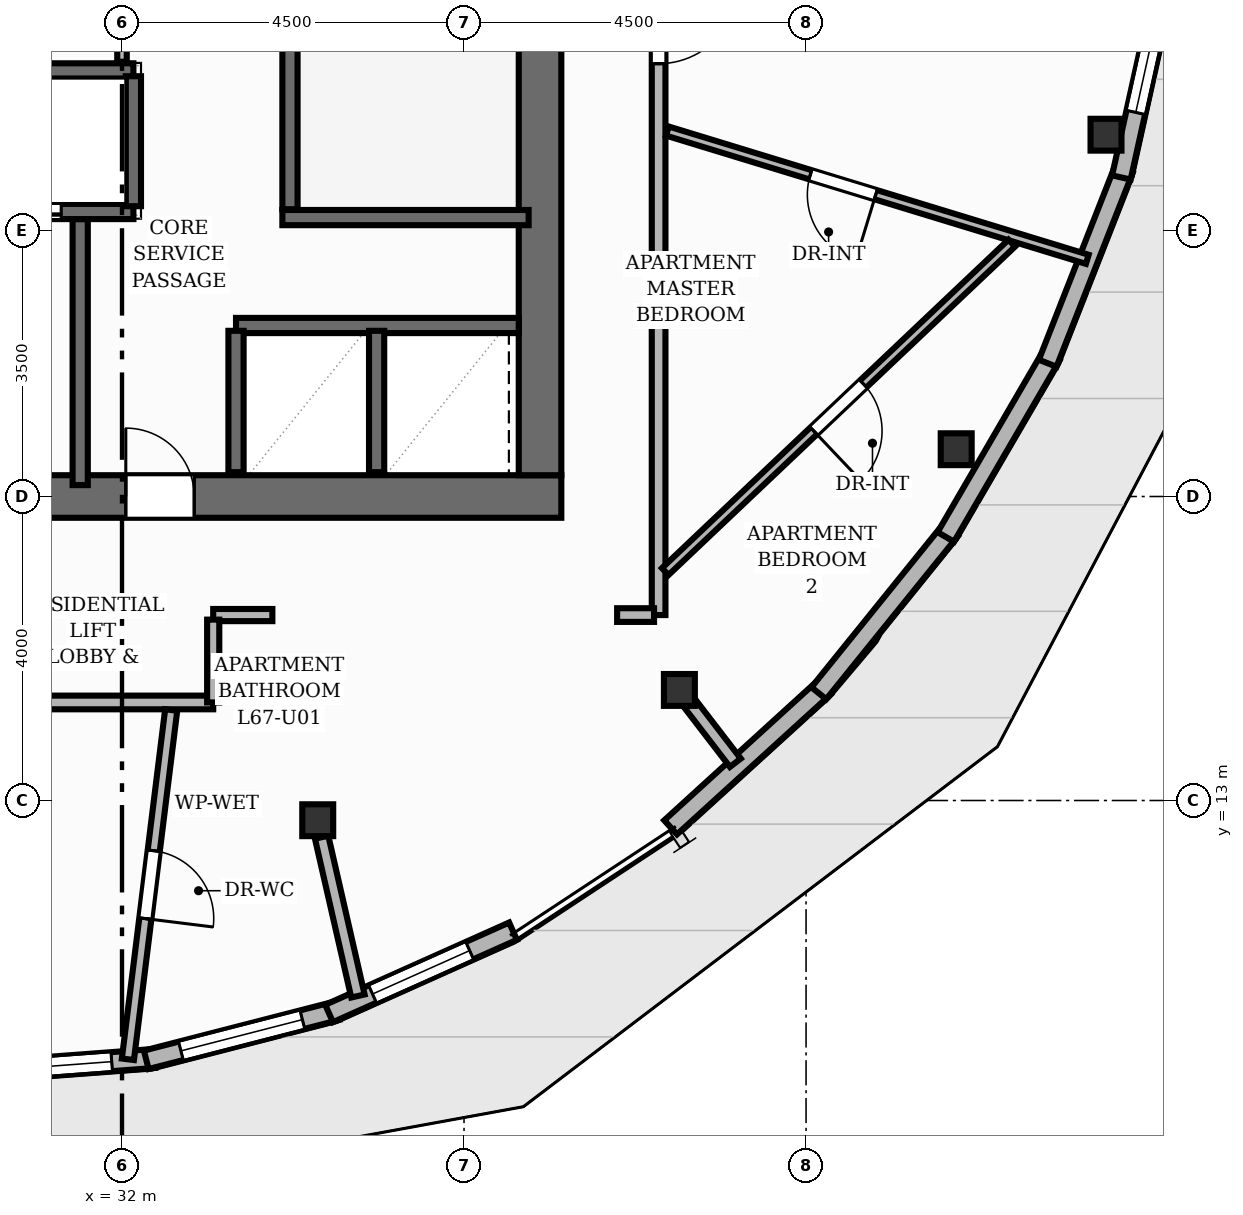
"""IFC4 building model, lengths in metres.
Left out: names, types, materials, properties, quantities, classifications, styles, units other than length and angle.
Written with IfcOpenShell. Run it as: python <this file> out.ifc"""

import sys

from ifc_helpers import new_model, si_unit, direction, frame, frame_2d, origin, origin_2d, place, context, subcontext, project, spatial, rectangle, i_section, extrude, element, fill, save


model = new_model("IFC4")
c1 = context("Model", 3, precision=1e-05, world=origin(), true_north=direction((0.0, 1.0)))
c2 = subcontext(c1, "Body", "Model", "MODEL_VIEW")
j1 = project(units=[si_unit("LENGTHUNIT", "METRE"), si_unit("PLANEANGLEUNIT", "RADIAN")], contexts=[c1])
p1 = place(None, origin())
s1 = spatial("IfcSite", under=j1, at=p1, CompositionType="ELEMENT")
p2 = place(p1, origin())
s2 = spatial("IfcBuilding", under=s1, at=p2, CompositionType="ELEMENT")
p3 = place(p2, frame((0.0, 0.0, 223.84)))
s3 = spatial("IfcBuildingStorey", under=s2, at=p3, CompositionType="ELEMENT", Elevation=223.84)
p4 = place(p3, frame((26.22, 17.0, 0.0), z_axis=(0.0, 0.0, 1.0), x_axis=(1.0, 0.0, 0.0)))
e1 = element("IfcWall", 1, at=p4, inside=s3, PredefinedType="SHEAR", context=c2, shape_type="SweptSolid", body=[
    extrude(rectangle(XDim=11.56, YDim=0.56, at=frame_2d((5.78, 0.0))), origin(), (0.0, 0.0, 1.0), 3.2),
])
p5 = place(p4, frame((2.28, 0.0, 0.0)))
e2 = element("IfcOpeningElement", 2, at=p5, cuts=e1, PredefinedType="OPENING", context=c2, shape_type="SweptSolid", body=[
    extrude(rectangle(XDim=1.1, YDim=2.15, at=frame_2d((0.55, 1.075))), frame((0.0, 0.29, 0.0), z_axis=(0.0, -1.0, 0.0), x_axis=(1.0, 0.0, 0.0)), (0.0, 0.0, 1.0), 0.58),
])
p6 = place(p4, frame((5.83, 0.0, 0.0)))
e3 = element("IfcOpeningElement", 3, at=p6, cuts=e1, PredefinedType="OPENING", context=c2, shape_type="SweptSolid", body=[
    extrude(rectangle(XDim=0.9, YDim=2.1, at=frame_2d((0.45, 1.05))), frame((0.0, 0.29, 0.0), z_axis=(0.0, -1.0, 0.0), x_axis=(1.0, 0.0, 0.0)), (0.0, 0.0, 1.0), 0.58),
])
p7 = place(p3, frame((37.5, 17.28, 0.0), z_axis=(0.0, 0.0, 1.0), x_axis=(0.0, 1.0, 0.0)))
e4 = element("IfcWall", 4, at=p7, inside=s3, PredefinedType="SHEAR", context=c2, shape_type="SweptSolid", body=[
    extrude(rectangle(XDim=13.44, YDim=0.56, at=frame_2d((6.72, 0.0))), origin(), (0.0, 0.0, 1.0), 3.2),
])
for number, where, z_axis, x_axis in (
    (5, (34.575, 12.74, 0.0), (0.0, 0.0, 1.0), (1.0, 0.0, 0.0)),
    (6, (39.333, 14.455, 0.0), (0.0, 0.0, 1.0), (1.0, 0.0, 0.0)),
    (7, (42.975, 17.622, 0.0), (0.0, 0.0, 1.0), (1.0, 0.0, 0.0)),
    (8, (44.946, 21.76, 0.0), (0.0, 0.0, 1.0), (1.0, 0.0, 0.0)),
):
    element("IfcColumn", number, at=place(p3, frame(where, z_axis=z_axis, x_axis=x_axis)), inside=s3, PredefinedType="COLUMN", context=c2, shape_type="SweptSolid", body=[
        extrude(i_section(OverallWidth=0.407, OverallDepth=0.419, WebThickness=0.031, FlangeThickness=0.049, at=origin_2d()), origin(), (0.0, 0.0, 1.0), 3.2),
    ])
p8 = place(p3, frame((32.429, 9.606, 0.0), z_axis=(0.0, 0.0, 1.0), x_axis=(-0.997203982256, -0.074727623888, 0.0)))
e9 = element("IfcWall", 9, at=p8, inside=s3, PredefinedType="SOLIDWALL", context=c2, shape_type="SweptSolid", body=[
    extrude(rectangle(XDim=2.532, YDim=0.25, at=frame_2d((1.266, 0.0))), origin(), (0.0, 0.0, 1.0), 2.96),
])
p9 = place(p8, frame((0.566, 0.0, 0.85)))
e10 = element("IfcOpeningElement", 10, at=p9, cuts=e9, PredefinedType="OPENING", context=c2, shape_type="SweptSolid", body=[
    extrude(rectangle(XDim=1.4, YDim=1.55, at=frame_2d((0.7, 0.775))), frame((0.0, 0.135, 0.0), z_axis=(0.0, -1.0, 0.0), x_axis=(1.0, 0.0, 0.0)), (0.0, 0.0, 1.0), 0.27),
])
p10 = place(p3, frame((34.829, 10.234, 0.0), z_axis=(0.0, 0.0, 1.0), x_axis=(-0.968423445169, -0.249311112562, 0.0)))
e11 = element("IfcWall", 11, at=p10, inside=s3, PredefinedType="SOLIDWALL", context=c2, shape_type="SweptSolid", body=[
    extrude(rectangle(XDim=2.592, YDim=0.25, at=frame_2d((1.296, 0.0))), origin(), (0.0, 0.0, 1.0), 2.96),
])
p11 = place(p10, frame((0.471, 0.0, 0.85)))
e12 = element("IfcOpeningElement", 12, at=p11, cuts=e11, PredefinedType="OPENING", context=c2, shape_type="SweptSolid", body=[
    extrude(rectangle(XDim=1.65, YDim=1.55, at=frame_2d((0.825, 0.775))), frame((0.0, 0.135, 0.0), z_axis=(0.0, -1.0, 0.0), x_axis=(1.0, 0.0, 0.0)), (0.0, 0.0, 1.0), 0.27),
])
p12 = place(p3, frame((37.145, 11.281, 0.0), z_axis=(0.0, 0.0, 1.0), x_axis=(-0.912779399898, -0.408452894617, 0.0)))
e13 = element("IfcWall", 13, at=p12, inside=s3, PredefinedType="SOLIDWALL", context=c2, shape_type="SweptSolid", body=[
    extrude(rectangle(XDim=2.651, YDim=0.25, at=frame_2d((1.325, 0.0))), origin(), (0.0, 0.0, 1.0), 2.96),
])
p13 = place(p12, frame((0.625, 0.0, 0.85)))
e14 = element("IfcOpeningElement", 14, at=p13, cuts=e13, PredefinedType="OPENING", context=c2, shape_type="SweptSolid", body=[
    extrude(rectangle(XDim=1.4, YDim=1.52, at=frame_2d((0.7, 0.76))), frame((0.0, 0.135, 0.0), z_axis=(0.0, -1.0, 0.0), x_axis=(1.0, 0.0, 0.0)), (0.0, 0.0, 1.0), 0.27),
])
p14 = place(p3, frame((41.243, 14.49, 0.0), z_axis=(0.0, 0.0, 1.0), x_axis=(-0.739366950434, -0.673302690182, 0.0)))
e15 = element("IfcWall", 15, at=p14, inside=s3, PredefinedType="SOLIDWALL", context=c2, shape_type="SweptSolid", body=[
    extrude(rectangle(XDim=2.738, YDim=0.25, at=frame_2d((1.369, 0.0))), origin(), (0.0, 0.0, 1.0), 2.96),
])
p15 = place(p3, frame((42.9, 16.558, 0.0), z_axis=(0.0, 0.0, 1.0), x_axis=(-0.628046541479, -0.778175778174, 0.0)))
e16 = element("IfcWall", 16, at=p15, inside=s3, PredefinedType="SOLIDWALL", context=c2, shape_type="SweptSolid", body=[
    extrude(rectangle(XDim=2.758, YDim=0.25, at=frame_2d((1.379, 0.0))), origin(), (0.0, 0.0, 1.0), 2.96),
])
p16 = place(p3, frame((44.227, 18.851, 0.0), z_axis=(0.0, 0.0, 1.0), x_axis=(-0.503177339128, -0.864183178144, 0.0)))
e17 = element("IfcWall", 17, at=p16, inside=s3, PredefinedType="SOLIDWALL", context=c2, shape_type="SweptSolid", body=[
    extrude(rectangle(XDim=2.758, YDim=0.25, at=frame_2d((1.379, 0.0))), origin(), (0.0, 0.0, 1.0), 2.96),
])
p17 = place(p3, frame((45.18, 21.302, 0.0), z_axis=(0.0, 0.0, 1.0), x_axis=(-0.365588934877, -0.930776412838, 0.0)))
e18 = element("IfcWall", 18, at=p17, inside=s3, PredefinedType="SOLIDWALL", context=c2, shape_type="SweptSolid", body=[
    extrude(rectangle(XDim=2.739, YDim=0.25, at=frame_2d((1.369, 0.0))), origin(), (0.0, 0.0, 1.0), 2.577),
])
p18 = place(p3, frame((45.733, 23.836, 0.0), z_axis=(0.0, 0.0, 1.0), x_axis=(-0.21633718885, -0.976318708579, 0.0)))
e19 = element("IfcWall", 19, at=p18, inside=s3, PredefinedType="SOLIDWALL", context=c2, shape_type="SweptSolid", body=[
    extrude(rectangle(XDim=2.702, YDim=0.25, at=frame_2d((1.351, 0.0))), origin(), (0.0, 0.0, 1.0), 2.577),
])
p19 = place(p18, frame((0.175, 0.0, 0.85)))
e20 = element("IfcOpeningElement", 20, at=p19, cuts=e19, PredefinedType="OPENING", context=c2, shape_type="SweptSolid", body=[
    extrude(rectangle(XDim=1.65, YDim=1.55, at=frame_2d((0.825, 0.775))), frame((0.0, 0.135, 0.0), z_axis=(0.0, -1.0, 0.0), x_axis=(1.0, 0.0, 0.0)), (0.0, 0.0, 1.0), 0.27),
])
p20 = place(p3, frame((34.21, 20.78, 0.0), z_axis=(0.0, 0.0, 1.0), x_axis=(0.0, 1.0, 0.0)))
e21 = element("IfcWall", 21, at=p20, inside=s3, PredefinedType="SHEAR", context=c2, shape_type="SweptSolid", body=[
    extrude(rectangle(XDim=6.44, YDim=0.2, at=frame_2d((3.22, 0.0))), origin(), (0.0, 0.0, 1.0), 3.2),
])
p21 = place(p3, frame((34.11, 20.67, 0.0), z_axis=(0.0, 0.0, 1.0), x_axis=(1.0, 0.0, 0.0)))
e22 = element("IfcWall", 22, at=p21, inside=s3, PredefinedType="SHEAR", context=c2, shape_type="SweptSolid", body=[
    extrude(rectangle(XDim=3.24, YDim=0.2, at=frame_2d((1.62, 0.0))), origin(), (0.0, 0.0, 1.0), 3.2),
])
p22 = place(p3, frame((31.45, 17.15, 0.0), z_axis=(0.0, 0.0, 1.0), x_axis=(0.0, 1.0, 0.0)))
e23 = element("IfcWall", 23, at=p22, inside=s3, PredefinedType="SHEAR", context=c2, shape_type="SweptSolid", body=[
    extrude(rectangle(XDim=3.5, YDim=0.2, at=frame_2d((1.75, 0.0))), origin(), (0.0, 0.0, 1.0), 3.2),
])
p23 = place(p3, frame((29.85, 20.75, 0.0), z_axis=(0.0, 0.0, 1.0), x_axis=(1.0, 0.0, 0.0)))
e24 = element("IfcWall", 24, at=p23, inside=s3, PredefinedType="SHEAR", context=c2, shape_type="SweptSolid", body=[
    extrude(rectangle(XDim=2.3, YDim=0.2, at=frame_2d((1.15, 0.0))), origin(), (0.0, 0.0, 1.0), 3.2),
])
p24 = place(p23, frame((0.25, 0.0, 0.0)))
e25 = element("IfcOpeningElement", 25, at=p24, cuts=e24, PredefinedType="OPENING", context=c2, shape_type="SweptSolid", body=[
    extrude(rectangle(XDim=1.1, YDim=2.15, at=frame_2d((0.55, 1.075))), frame((0.0, 0.11, 0.0), z_axis=(0.0, -1.0, 0.0), x_axis=(1.0, 0.0, 0.0)), (0.0, 0.0, 1.0), 0.22),
])
p25 = place(p3, frame((29.85, 22.6, 0.0), z_axis=(0.0, 0.0, 1.0), x_axis=(1.0, 0.0, 0.0)))
e26 = element("IfcWall", 26, at=p25, inside=s3, PredefinedType="SHEAR", context=c2, shape_type="SweptSolid", body=[
    extrude(rectangle(XDim=2.3, YDim=0.2, at=frame_2d((1.15, 0.0))), origin(), (0.0, 0.0, 1.0), 3.2),
])
p26 = place(p3, frame((32.15, 20.82, 0.0), z_axis=(0.0, 0.0, 1.0), x_axis=(0.0, 1.0, 0.0)))
e27 = element("IfcWall", 27, at=p26, inside=s3, PredefinedType="SHEAR", context=c2, shape_type="SweptSolid", body=[
    extrude(rectangle(XDim=1.71, YDim=0.2, at=frame_2d((0.855, 0.0))), origin(), (0.0, 0.0, 1.0), 3.2),
])
p27 = place(p3, frame((33.5, 19.25, 0.0), z_axis=(0.0, 0.0, 1.0), x_axis=(1.0, 0.0, 0.0)))
e28 = element("IfcWall", 28, at=p27, inside=s3, PredefinedType="SHEAR", context=c2, shape_type="SweptSolid", body=[
    extrude(rectangle(XDim=3.72, YDim=0.2, at=frame_2d((1.86, 0.0))), origin(), (0.0, 0.0, 1.0), 3.2),
])
for number, where, z_axis, x_axis in (
    (29, (33.5, 17.32, 0.0), (0.0, 0.0, 1.0), (0.0, 1.0, 0.0)),
    (30, (35.35, 17.32, 0.0), (0.0, 0.0, 1.0), (0.0, 1.0, 0.0)),
):
    element("IfcWall", number, at=place(p3, frame(where, z_axis=z_axis, x_axis=x_axis)), inside=s3, PredefinedType="SHEAR", context=c2, shape_type="SweptSolid", body=[
        extrude(rectangle(XDim=1.86, YDim=0.2, at=frame_2d((0.93, 0.0))), origin(), (0.0, 0.0, 1.0), 3.2),
    ])
p28 = place(p3, frame((32.0, 22.72, 0.0), z_axis=(0.0, 0.0, 1.0), x_axis=(0.0, 1.0, 0.0)))
e31 = element("IfcWall", 31, at=p28, inside=s3, PredefinedType="PARTITIONING", context=c2, shape_type="SweptSolid", body=[
    extrude(rectangle(XDim=2.52, YDim=0.125, at=frame_2d((1.26, 0.0))), origin(), (0.0, 0.0, 1.0), 2.955),
])
p29 = place(p28, frame((0.18, 0.0, 0.0)))
e32 = element("IfcOpeningElement", 32, at=p29, cuts=e31, PredefinedType="OPENING", context=c2, shape_type="SweptSolid", body=[
    extrude(rectangle(XDim=0.9, YDim=2.1, at=frame_2d((0.45, 1.05))), frame((0.0, 0.073, 0.0), z_axis=(0.0, -1.0, 0.0), x_axis=(1.0, 0.0, 0.0)), (0.0, 0.0, 1.0), 0.145),
])
p30 = place(p3, frame((34.626, 12.517, 0.0), z_axis=(0.0, 0.0, 1.0), x_axis=(0.222945438732, -0.974830924493, 0.0)))
e33 = element("IfcWall", 33, at=p30, inside=s3, PredefinedType="PARTITIONING", context=c2, shape_type="SweptSolid", body=[
    extrude(rectangle(XDim=2.143, YDim=0.18, at=frame_2d((1.072, 0.0))), origin(), (0.0, 0.0, 1.0), 2.403),
])
p31 = place(p3, frame((39.473, 14.273, 0.0), z_axis=(0.0, 0.0, 1.0), x_axis=(0.60918017505, -0.793031849503, 0.0)))
e34 = element("IfcWall", 34, at=p31, inside=s3, PredefinedType="PARTITIONING", context=c2, shape_type="SweptSolid", body=[
    extrude(rectangle(XDim=0.979, YDim=0.18, at=frame_2d((0.489, 0.0))), origin(), (0.0, 0.0, 1.0), 2.403),
])
p32 = place(p3, frame((33.2, 14.29, 0.0), z_axis=(0.0, 0.0, 1.0), x_axis=(-1.0, 0.0, 0.0)))
e35 = element("IfcWall", 35, at=p32, inside=s3, PredefinedType="PARTITIONING", context=c2, shape_type="SweptSolid", body=[
    extrude(rectangle(XDim=2.4, YDim=0.18, at=frame_2d((1.2, 0.0))), origin(), (0.0, 0.0, 1.0), 2.955),
])
p33 = place(p3, frame((33.978, 15.44, 0.0), z_axis=(0.0, 0.0, 1.0), x_axis=(-1.0, 0.0, 0.0)))
e36 = element("IfcWall", 36, at=p33, inside=s3, PredefinedType="PLUMBINGWALL", context=c2, shape_type="SweptSolid", body=[
    extrude(rectangle(XDim=0.778, YDim=0.16, at=frame_2d((0.389, 0.0))), origin(), (0.0, 0.0, 1.0), 2.955),
])
p34 = place(p3, frame((33.2, 15.38, 0.0), z_axis=(0.0, 0.0, 1.0), x_axis=(0.0, -1.0, 0.0)))
e37 = element("IfcWall", 37, at=p34, inside=s3, PredefinedType="PLUMBINGWALL", context=c2, shape_type="SweptSolid", body=[
    extrude(rectangle(XDim=1.09, YDim=0.16, at=frame_2d((0.545, 0.0))), origin(), (0.0, 0.0, 1.0), 2.955),
])
p35 = place(p3, frame((39.06, 32.56, 0.0), z_axis=(0.0, 0.0, 1.0), x_axis=(0.0, -1.0, 0.0)))
e38 = element("IfcWall", 38, at=p35, inside=s3, PredefinedType="PARTITIONING", context=c2, shape_type="SweptSolid", body=[
    extrude(rectangle(XDim=17.12, YDim=0.18, at=frame_2d((8.56, 0.0))), origin(), (0.0, 0.0, 1.0), 2.955),
])
p36 = place(p35, frame((8.815, 0.0, 0.0)))
e39 = element("IfcOpeningElement", 39, at=p36, cuts=e38, PredefinedType="OPENING", context=c2, shape_type="SweptSolid", body=[
    extrude(rectangle(XDim=1.05, YDim=2.15, at=frame_2d((0.525, 1.075))), frame((0.0, 0.1, 0.0), z_axis=(0.0, -1.0, 0.0), x_axis=(1.0, 0.0, 0.0)), (0.0, 0.0, 1.0), 0.2),
])
p37 = place(p3, frame((39.0, 15.44, 0.0), z_axis=(0.0, 0.0, 1.0), x_axis=(-1.0, 0.0, 0.0)))
e40 = element("IfcWall", 40, at=p37, inside=s3, PredefinedType="PARTITIONING", context=c2, shape_type="SweptSolid", body=[
    extrude(rectangle(XDim=0.486, YDim=0.18, at=frame_2d((0.243, 0.0))), origin(), (0.0, 0.0, 1.0), 2.955),
])
p38 = place(p3, frame((32.647, 14.191, 0.0), z_axis=(0.0, 0.0, 1.0), x_axis=(-0.123041966912, -0.992401468348, 0.0)))
e41 = element("IfcWall", 41, at=p38, inside=s3, PredefinedType="PLUMBINGWALL", context=c2, shape_type="SweptSolid", body=[
    extrude(rectangle(XDim=4.631, YDim=0.16, at=frame_2d((2.315, 0.0))), origin(), (0.0, 0.0, 1.0), 2.692),
])
p39 = place(p38, frame((1.865, 0.0, 0.0)))
e42 = element("IfcOpeningElement", 42, at=p39, cuts=e41, PredefinedType="OPENING", context=c2, shape_type="SweptSolid", body=[
    extrude(rectangle(XDim=0.9, YDim=2.1, at=frame_2d((0.45, 1.05))), frame((0.0, 0.09, 0.0), z_axis=(0.0, -1.0, 0.0), x_axis=(1.0, 0.0, 0.0)), (0.0, 0.0, 1.0), 0.18),
])
p40 = place(p3, frame((44.7, 20.121, 0.0), z_axis=(0.0, 0.0, 1.0), x_axis=(-0.956379122361, 0.29212835246, 0.0)))
e43 = element("IfcWall", 43, at=p40, inside=s3, PredefinedType="PARTITIONING", context=c2, shape_type="SweptSolid", body=[
    extrude(rectangle(XDim=5.777, YDim=0.125, at=frame_2d((2.889, 0.0))), origin(), (0.0, 0.0, 1.0), 2.692),
])
p41 = place(p40, frame((2.91, 0.0, 0.0)))
e44 = element("IfcOpeningElement", 44, at=p41, cuts=e43, PredefinedType="OPENING", context=c2, shape_type="SweptSolid", body=[
    extrude(rectangle(XDim=0.9, YDim=2.1, at=frame_2d((0.45, 1.05))), frame((0.0, 0.073, 0.0), z_axis=(0.0, -1.0, 0.0), x_axis=(1.0, 0.0, 0.0)), (0.0, 0.0, 1.0), 0.145),
])
p42 = place(p3, frame((43.707, 20.333, 0.0), z_axis=(0.0, 0.0, 1.0), x_axis=(-0.725799476315, -0.687906330965, 0.0)))
e45 = element("IfcWall", 45, at=p42, inside=s3, PredefinedType="PARTITIONING", context=c2, shape_type="SweptSolid", body=[
    extrude(rectangle(XDim=6.282, YDim=0.125, at=frame_2d((3.141, 0.0))), origin(), (0.0, 0.0, 1.0), 2.955),
])
p43 = place(p42, frame((2.691, 0.0, 0.0)))
e46 = element("IfcOpeningElement", 46, at=p43, cuts=e45, PredefinedType="OPENING", context=c2, shape_type="SweptSolid", body=[
    extrude(rectangle(XDim=0.9, YDim=2.1, at=frame_2d((0.45, 1.05))), frame((0.0, 0.073, 0.0), z_axis=(0.0, -1.0, 0.0), x_axis=(1.0, 0.0, 0.0)), (0.0, 0.0, 1.0), 0.145),
])
p44 = place(p9, origin())
e47 = element("IfcWindow", 47, at=p44, inside=s3, PartitioningType="SINGLE_PANEL", PredefinedType="WINDOW", context=c2, shape_type="SweptSolid", body=[
    extrude(rectangle(XDim=1.4, YDim=1.55, at=frame_2d((0.7, 0.775))), frame((0.0, 0.03, 0.0), z_axis=(0.0, -1.0, 0.0), x_axis=(1.0, 0.0, 0.0)), (0.0, 0.0, 1.0), 0.06),
])
fill(e10, e47)
p45 = place(p11, origin())
e48 = element("IfcWindow", 48, at=p45, inside=s3, PartitioningType="SINGLE_PANEL", PredefinedType="WINDOW", context=c2, shape_type="SweptSolid", body=[
    extrude(rectangle(XDim=1.65, YDim=1.55, at=frame_2d((0.825, 0.775))), frame((0.0, 0.03, 0.0), z_axis=(0.0, -1.0, 0.0), x_axis=(1.0, 0.0, 0.0)), (0.0, 0.0, 1.0), 0.06),
])
fill(e12, e48)
p46 = place(p13, origin())
e49 = element("IfcWindow", 49, at=p46, inside=s3, PartitioningType="SINGLE_PANEL", PredefinedType="WINDOW", context=c2, shape_type="SweptSolid", body=[
    extrude(rectangle(XDim=1.4, YDim=1.52, at=frame_2d((0.7, 0.76))), frame((0.0, 0.03, 0.0), z_axis=(0.0, -1.0, 0.0), x_axis=(1.0, 0.0, 0.0)), (0.0, 0.0, 1.0), 0.06),
])
fill(e14, e49)
p47 = place(p19, origin())
e50 = element("IfcWindow", 50, at=p47, inside=s3, PartitioningType="SINGLE_PANEL", PredefinedType="WINDOW", context=c2, shape_type="SweptSolid", body=[
    extrude(rectangle(XDim=1.65, YDim=1.55, at=frame_2d((0.825, 0.775))), frame((0.0, 0.03, 0.0), z_axis=(0.0, -1.0, 0.0), x_axis=(1.0, 0.0, 0.0)), (0.0, 0.0, 1.0), 0.06),
])
fill(e20, e50)
p48 = place(p24, origin())
e51 = element("IfcDoor", 51, at=p48, inside=s3, OperationType="DOUBLE_DOOR_SLIDING", PredefinedType="DOOR", context=c2, shape_type="SweptSolid", body=[
    extrude(rectangle(XDim=1.1, YDim=2.15, at=frame_2d((0.55, 1.075))), frame((0.0, 0.025, 0.0), z_axis=(0.0, -1.0, 0.0), x_axis=(1.0, 0.0, 0.0)), (0.0, 0.0, 1.0), 0.05),
])
fill(e25, e51)
p49 = place(p6, origin())
e52 = element("IfcDoor", 52, at=p49, inside=s3, OperationType="SINGLE_SWING_LEFT", PredefinedType="DOOR", context=c2, shape_type="SweptSolid", body=[
    extrude(rectangle(XDim=0.9, YDim=2.1, at=frame_2d((0.45, 1.05))), frame((0.0, 0.025, 0.0), z_axis=(0.0, -1.0, 0.0), x_axis=(1.0, 0.0, 0.0)), (0.0, 0.0, 1.0), 0.05),
])
fill(e3, e52)
p50 = place(p39, origin())
e53 = element("IfcDoor", 53, at=p50, inside=s3, OperationType="SINGLE_SWING_RIGHT", PredefinedType="DOOR", context=c2, shape_type="SweptSolid", body=[
    extrude(rectangle(XDim=0.9, YDim=2.1, at=frame_2d((0.45, 1.05))), frame((0.0, 0.025, 0.0), z_axis=(0.0, -1.0, 0.0), x_axis=(1.0, 0.0, 0.0)), (0.0, 0.0, 1.0), 0.05),
])
fill(e42, e53)
p51 = place(p36, origin())
e54 = element("IfcDoor", 54, at=p51, inside=s3, OperationType="SINGLE_SWING_LEFT", PredefinedType="DOOR", context=c2, shape_type="SweptSolid", body=[
    extrude(rectangle(XDim=1.05, YDim=2.15, at=frame_2d((0.525, 1.075))), frame((0.0, 0.025, 0.0), z_axis=(0.0, -1.0, 0.0), x_axis=(1.0, 0.0, 0.0)), (0.0, 0.0, 1.0), 0.05),
])
fill(e39, e54)
p52 = place(p41, origin())
e55 = element("IfcDoor", 55, at=p52, inside=s3, OperationType="SINGLE_SWING_LEFT", PredefinedType="DOOR", context=c2, shape_type="SweptSolid", body=[
    extrude(rectangle(XDim=0.9, YDim=2.1, at=frame_2d((0.45, 1.05))), frame((0.0, 0.025, 0.0), z_axis=(0.0, -1.0, 0.0), x_axis=(1.0, 0.0, 0.0)), (0.0, 0.0, 1.0), 0.05),
])
fill(e44, e55)
p53 = place(p43, origin())
e56 = element("IfcDoor", 56, at=p53, inside=s3, OperationType="SINGLE_SWING_RIGHT", PredefinedType="DOOR", context=c2, shape_type="SweptSolid", body=[
    extrude(rectangle(XDim=0.9, YDim=2.1, at=frame_2d((0.45, 1.05))), frame((0.0, 0.025, 0.0), z_axis=(0.0, -1.0, 0.0), x_axis=(1.0, 0.0, 0.0)), (0.0, 0.0, 1.0), 0.05),
])
fill(e46, e56)
save(model, sys.argv[1])
